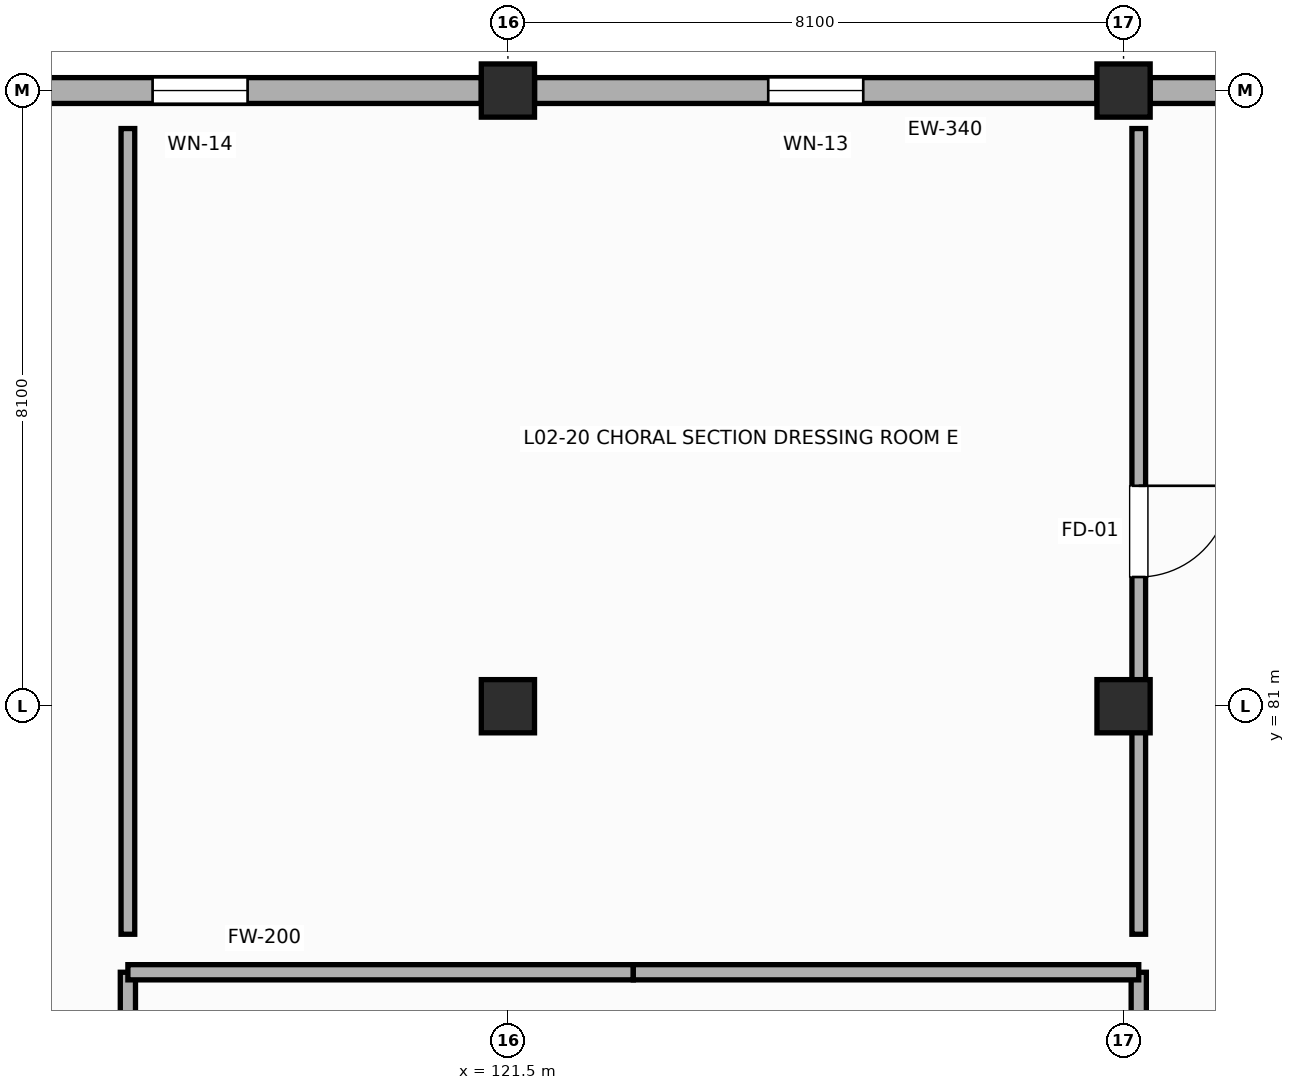
"""IFC4 building model, lengths in metres.
Left out: names, types, materials, properties, quantities, classifications, styles, units other than length and angle.
Written with IfcOpenShell. Run it as: python <this file> out.ifc"""

import sys

from ifc_helpers import new_model, si_unit, direction, frame, frame_2d, origin, origin_2d, place, context, subcontext, project, spatial, rectangle, extrude, element, fill, save


model = new_model("IFC4")
c1 = context("Model", 3, precision=1e-05, world=origin(), true_north=direction((0.0, 1.0)))
c2 = subcontext(c1, "Body", "Model", "MODEL_VIEW")
j1 = project(units=[si_unit("LENGTHUNIT", "METRE"), si_unit("PLANEANGLEUNIT", "RADIAN")], contexts=[c1])
p1 = place(None, origin())
s1 = spatial("IfcSite", under=j1, at=p1, CompositionType="ELEMENT")
p2 = place(p1, origin())
s2 = spatial("IfcBuilding", under=s1, at=p2, CompositionType="ELEMENT")
p3 = place(p2, frame((0.0, 0.0, 10.2)))
s3 = spatial("IfcBuildingStorey", under=s2, at=p3, CompositionType="ELEMENT", Elevation=10.2)
for number, where, z_axis, x_axis in (
    (1, (121.5, 81.0, 0.0), (0.0, 0.0, 1.0), (1.0, 0.0, 0.0)),
    (2, (121.5, 89.1, 0.0), (0.0, 0.0, 1.0), (1.0, 0.0, 0.0)),
    (3, (129.6, 81.0, 0.0), (0.0, 0.0, 1.0), (1.0, 0.0, 0.0)),
    (4, (129.6, 89.1, 0.0), (0.0, 0.0, 1.0), (1.0, 0.0, 0.0)),
):
    element("IfcColumn", number, at=place(p3, frame(where, z_axis=z_axis, x_axis=x_axis)), inside=s3, PredefinedType="COLUMN", context=c2, shape_type="SweptSolid", body=[
        extrude(rectangle(XDim=0.7, YDim=0.7, at=origin_2d()), origin(), (0.0, 0.0, 1.0), 4.8),
    ])
p4 = place(p3, frame((137.35, 89.1, 0.0), z_axis=(0.0, 0.0, 1.0), x_axis=(-1.0, 0.0, 0.0)))
e5 = element("IfcWall", 5, at=p4, inside=s3, PredefinedType="SOLIDWALL", context=c2, shape_type="SweptSolid", body=[
    extrude(rectangle(XDim=7.4, YDim=0.34, at=frame_2d((3.7, 0.0))), origin(), (0.0, 0.0, 1.0), 4.127),
])
p5 = place(p3, frame((129.25, 89.1, 0.0), z_axis=(0.0, 0.0, 1.0), x_axis=(-1.0, 0.0, 0.0)))
e6 = element("IfcWall", 6, at=p5, inside=s3, PredefinedType="SOLIDWALL", context=c2, shape_type="SweptSolid", body=[
    extrude(rectangle(XDim=7.4, YDim=0.34, at=frame_2d((3.7, 0.0))), origin(), (0.0, 0.0, 1.0), 4.075),
])
p6 = place(p5, frame((3.075, 0.0, 0.9)))
e7 = element("IfcOpeningElement", 7, at=p6, cuts=e6, PredefinedType="OPENING", context=c2, shape_type="SweptSolid", body=[
    extrude(rectangle(XDim=1.25, YDim=1.25, at=frame_2d((0.625, 0.625))), frame((0.0, 0.18, 0.0), z_axis=(0.0, -1.0, 0.0), x_axis=(1.0, 0.0, 0.0)), (0.0, 0.0, 1.0), 0.36),
])
p7 = place(p3, frame((121.15, 89.1, 0.0), z_axis=(0.0, 0.0, 1.0), x_axis=(-1.0, 0.0, 0.0)))
e8 = element("IfcWall", 8, at=p7, inside=s3, PredefinedType="SOLIDWALL", context=c2, shape_type="SweptSolid", body=[
    extrude(rectangle(XDim=7.4, YDim=0.34, at=frame_2d((3.7, 0.0))), origin(), (0.0, 0.0, 1.0), 4.127),
])
p8 = place(p7, frame((3.075, 0.0, 0.9)))
e9 = element("IfcOpeningElement", 9, at=p8, cuts=e8, PredefinedType="OPENING", context=c2, shape_type="SweptSolid", body=[
    extrude(rectangle(XDim=1.25, YDim=1.55, at=frame_2d((0.625, 0.775))), frame((0.0, 0.18, 0.0), z_axis=(0.0, -1.0, 0.0), x_axis=(1.0, 0.0, 0.0)), (0.0, 0.0, 1.0), 0.36),
])
p9 = place(p3, frame((129.8, 77.5, 0.0), z_axis=(0.0, 0.0, 1.0), x_axis=(0.0, -1.0, 0.0)))
e10 = element("IfcWall", 10, at=p9, inside=s3, PredefinedType="PARTITIONING", context=c2, shape_type="SweptSolid", body=[
    extrude(rectangle(XDim=10.5, YDim=0.2, at=frame_2d((5.25, 0.0))), origin(), (0.0, 0.0, 1.0), 3.844),
])
p10 = place(p9, frame((7.225, 0.0, 0.0)))
e11 = element("IfcOpeningElement", 11, at=p10, cuts=e10, PredefinedType="OPENING", context=c2, shape_type="SweptSolid", body=[
    extrude(rectangle(XDim=1.3, YDim=2.36, at=frame_2d((0.65, 1.18))), frame((0.0, 0.11, 0.0), z_axis=(0.0, -1.0, 0.0), x_axis=(1.0, 0.0, 0.0)), (0.0, 0.0, 1.0), 0.22),
])
p11 = place(p3, frame((116.5, 67.0, 0.0), z_axis=(0.0, 0.0, 1.0), x_axis=(0.0, 1.0, 0.0)))
e12 = element("IfcWall", 12, at=p11, inside=s3, PredefinedType="PARTITIONING", context=c2, shape_type="SweptSolid", body=[
    extrude(rectangle(XDim=10.5, YDim=0.2, at=frame_2d((5.25, 0.0))), origin(), (0.0, 0.0, 1.0), 4.52),
])
p12 = place(p3, frame((116.5, 77.5, 0.0), z_axis=(0.0, 0.0, 1.0), x_axis=(1.0, 0.0, 0.0)))
e13 = element("IfcWall", 13, at=p12, inside=s3, PredefinedType="PARTITIONING", context=c2, shape_type="SweptSolid", body=[
    extrude(rectangle(XDim=6.65, YDim=0.2, at=frame_2d((3.325, 0.0))), origin(), (0.0, 0.0, 1.0), 4.52),
])
p13 = place(p3, frame((123.15, 77.5, 0.0), z_axis=(0.0, 0.0, 1.0), x_axis=(1.0, 0.0, 0.0)))
e14 = element("IfcWall", 14, at=p13, inside=s3, PredefinedType="PARTITIONING", context=c2, shape_type="SweptSolid", body=[
    extrude(rectangle(XDim=6.65, YDim=0.2, at=frame_2d((3.325, 0.0))), origin(), (0.0, 0.0, 1.0), 4.52),
])
p14 = place(p3, frame((129.8, 88.6, 0.0), z_axis=(0.0, 0.0, 1.0), x_axis=(0.0, -1.0, 0.0)))
e15 = element("IfcWall", 15, at=p14, inside=s3, PredefinedType="PARTITIONING", context=c2, shape_type="SweptSolid", body=[
    extrude(rectangle(XDim=10.6, YDim=0.18, at=frame_2d((5.3, 0.0))), origin(), (0.0, 0.0, 1.0), 3.944),
])
p15 = place(p14, frame((4.7, 0.0, 0.0)))
e16 = element("IfcOpeningElement", 16, at=p15, cuts=e15, PredefinedType="OPENING", context=c2, shape_type="SweptSolid", body=[
    extrude(rectangle(XDim=1.2, YDim=2.25, at=frame_2d((0.6, 1.125))), frame((0.0, 0.1, 0.0), z_axis=(0.0, -1.0, 0.0), x_axis=(1.0, 0.0, 0.0)), (0.0, 0.0, 1.0), 0.2),
])
p16 = place(p3, frame((116.5, 78.0, 0.0), z_axis=(0.0, 0.0, 1.0), x_axis=(0.0, 1.0, 0.0)))
e17 = element("IfcWall", 17, at=p16, inside=s3, PredefinedType="PARTITIONING", context=c2, shape_type="SweptSolid", body=[
    extrude(rectangle(XDim=10.6, YDim=0.18, at=frame_2d((5.3, 0.0))), origin(), (0.0, 0.0, 1.0), 4.52),
])
p17 = place(p6, origin())
e18 = element("IfcWindow", 18, at=p17, inside=s3, PartitioningType="SINGLE_PANEL", PredefinedType="WINDOW", context=c2, shape_type="SweptSolid", body=[
    extrude(rectangle(XDim=1.25, YDim=1.25, at=frame_2d((0.625, 0.625))), frame((0.0, 0.03, 0.0), z_axis=(0.0, -1.0, 0.0), x_axis=(1.0, 0.0, 0.0)), (0.0, 0.0, 1.0), 0.06),
])
fill(e7, e18)
p18 = place(p8, origin())
e19 = element("IfcWindow", 19, at=p18, inside=s3, PartitioningType="SINGLE_PANEL", PredefinedType="WINDOW", context=c2, shape_type="SweptSolid", body=[
    extrude(rectangle(XDim=1.25, YDim=1.55, at=frame_2d((0.625, 0.775))), frame((0.0, 0.03, 0.0), z_axis=(0.0, -1.0, 0.0), x_axis=(1.0, 0.0, 0.0)), (0.0, 0.0, 1.0), 0.06),
])
fill(e9, e19)
p19 = place(p15, origin())
e20 = element("IfcDoor", 20, at=p19, inside=s3, OperationType="SINGLE_SWING_LEFT", PredefinedType="DOOR", context=c2, shape_type="SweptSolid", body=[
    extrude(rectangle(XDim=1.2, YDim=2.25, at=frame_2d((0.6, 1.125))), frame((0.0, 0.025, 0.0), z_axis=(0.0, -1.0, 0.0), x_axis=(1.0, 0.0, 0.0)), (0.0, 0.0, 1.0), 0.05),
])
fill(e16, e20)
save(model, sys.argv[1])
